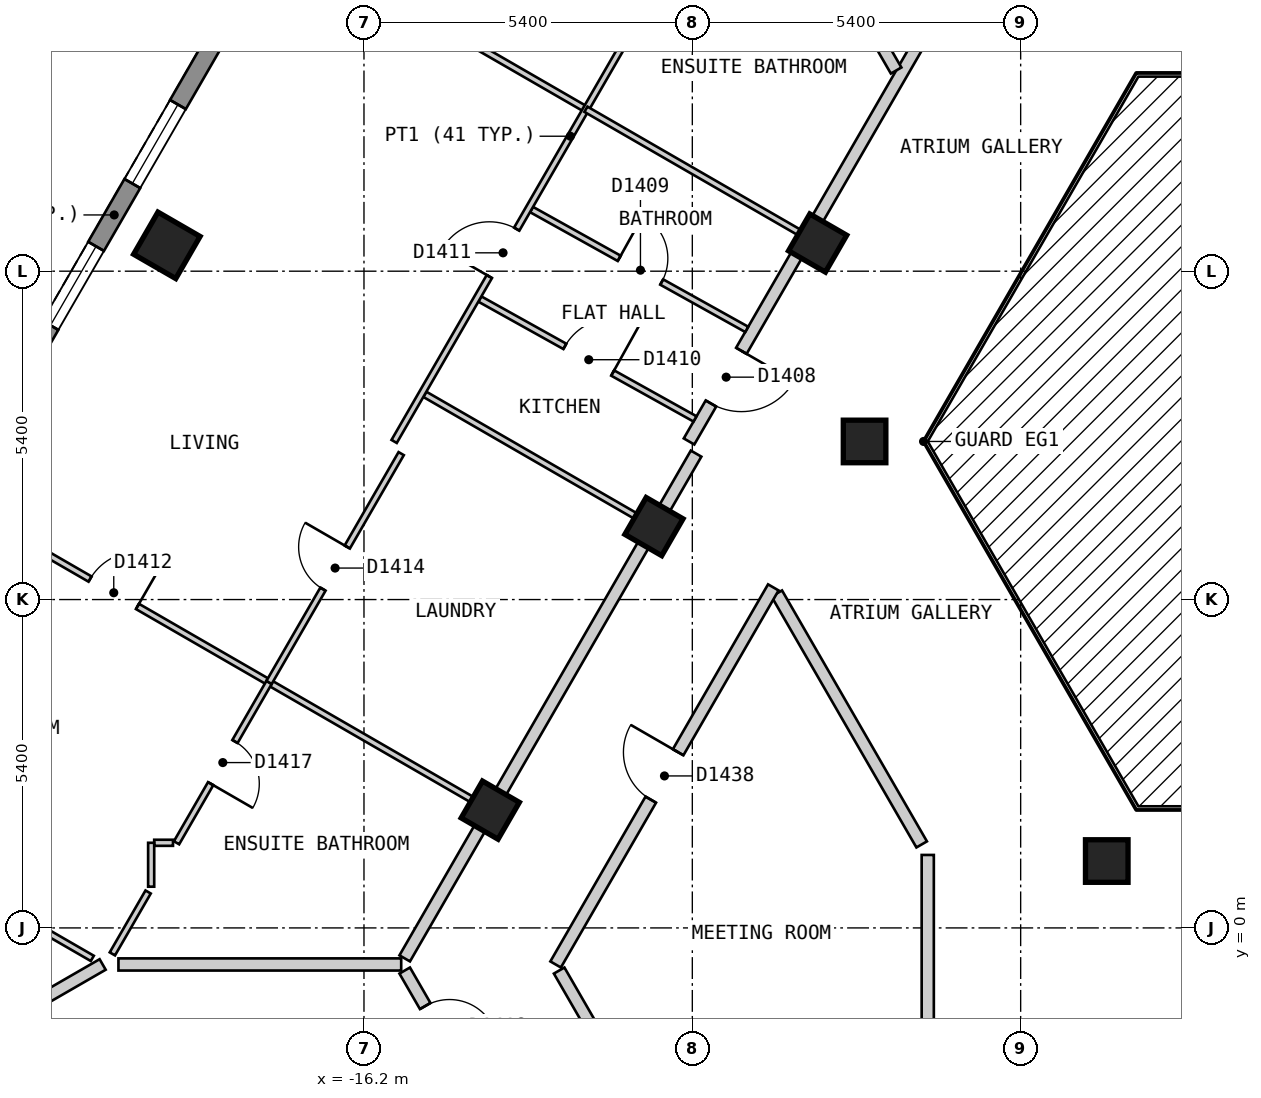
"""IFC4 building model, lengths in metres.
Left out: names, types, materials, properties, quantities, classifications, styles, units other than length and angle.
Written with IfcOpenShell. Run it as: python <this file> out.ifc"""

import sys

from ifc_helpers import new_model, si_unit, direction, frame, frame_2d, origin, origin_2d, place, context, subcontext, project, spatial, polyline, rectangle, outline, extrude, element, fill, save


model = new_model("IFC4")
c1 = context("Model", 3, precision=1e-05, world=origin(), true_north=direction((0.0, 1.0)))
c2 = subcontext(c1, "Body", "Model", "MODEL_VIEW")
j1 = project(units=[si_unit("LENGTHUNIT", "METRE"), si_unit("PLANEANGLEUNIT", "RADIAN")], contexts=[c1])
p1 = place(None, origin())
s1 = spatial("IfcSite", under=j1, at=p1, CompositionType="ELEMENT")
p2 = place(p1, origin())
s2 = spatial("IfcBuilding", under=s1, at=p2, CompositionType="ELEMENT")
p3 = place(p2, frame((0.0, 0.0, 178.2)))
s3 = spatial("IfcBuildingStorey", under=s2, at=p3, CompositionType="ELEMENT", Elevation=178.2)
p4 = place(p3, frame((-19.442, 11.225, 0.0), z_axis=(0.0, 0.0, 1.0), x_axis=(-0.5, -0.866025403784, 0.0)))
e1 = element("IfcColumn", 1, at=p4, inside=s3, PredefinedType="COLUMN", context=c2, shape_type="SweptSolid", body=[
    extrude(rectangle(XDim=0.8, YDim=0.8, at=origin_2d()), origin(), (0.0, 0.0, 1.0), 3.0),
])
for number, where, z_axis, x_axis in (
    (2, (-8.739, 11.263, 0.0), (0.0, 0.0, 1.0), (-0.5, -0.866, 0.0)),
    (3, (-7.967, 8.0, 0.0), (0.0, 0.0, 1.0), (1.0, 0.0, 0.0)),
    (4, (-11.431, 6.6, 0.0), (0.0, 0.0, 1.0), (-0.5, -0.866, 0.0)),
    (5, (-3.984, 1.1, 0.0), (0.0, 0.0, 1.0), (1.0, 0.0, 0.0)),
    (6, (-14.123, 1.937, 0.0), (0.0, 0.0, 1.0), (-0.5, -0.866, 0.0)),
):
    element("IfcColumn", number, at=place(p3, frame(where, z_axis=z_axis, x_axis=x_axis)), inside=s3, PredefinedType="COLUMN", context=c2, shape_type="SweptSolid", body=[
        extrude(rectangle(XDim=0.7, YDim=0.7, at=origin_2d()), origin(), (0.0, 0.0, 1.0), 3.0),
    ])
p5 = place(p3, frame((-14.592, 21.625, 0.0), z_axis=(0.0, 0.0, 1.0), x_axis=(-0.500010537973, -0.866019319597, 0.0)))
e7 = element("IfcWall", 7, at=p5, inside=s3, PredefinedType="SOLIDWALL", context=c2, shape_type="SweptSolid", body=[
    extrude(outline(polyline([(0.0, -0.15), (22.863, -0.15), (22.783, 0.15), (0.08, 0.15), (0.0, -0.15)])), origin(), (0.0, 0.0, 1.0), 2.7),
])
p6 = place(p5, frame((1.259, 0.0, 0.15)))
e8 = element("IfcOpeningElement", 8, at=p6, cuts=e7, PredefinedType="OPENING", context=c2, shape_type="SweptSolid", body=[
    extrude(rectangle(XDim=1.5, YDim=2.1, at=frame_2d((0.75, 1.05))), frame((0.0, 0.16, 0.0), z_axis=(0.0, -1.0, 0.0), x_axis=(1.0, 0.0, 0.0)), (0.0, 0.0, 1.0), 0.32),
])
p7 = place(p5, frame((3.952, 0.0, 0.15)))
e9 = element("IfcOpeningElement", 9, at=p7, cuts=e7, PredefinedType="OPENING", context=c2, shape_type="SweptSolid", body=[
    extrude(rectangle(XDim=1.5, YDim=2.1, at=frame_2d((0.75, 1.05))), frame((0.0, 0.16, 0.0), z_axis=(0.0, -1.0, 0.0), x_axis=(1.0, 0.0, 0.0)), (0.0, 0.0, 1.0), 0.32),
])
p8 = place(p5, frame((6.644, 0.0, 0.15)))
e10 = element("IfcOpeningElement", 10, at=p8, cuts=e7, PredefinedType="OPENING", context=c2, shape_type="SweptSolid", body=[
    extrude(rectangle(XDim=1.5, YDim=2.1, at=frame_2d((0.75, 1.05))), frame((0.0, 0.16, 0.0), z_axis=(0.0, -1.0, 0.0), x_axis=(1.0, 0.0, 0.0)), (0.0, 0.0, 1.0), 0.32),
])
p9 = place(p5, frame((9.335, 0.0, 0.15)))
e11 = element("IfcOpeningElement", 11, at=p9, cuts=e7, PredefinedType="OPENING", context=c2, shape_type="SweptSolid", body=[
    extrude(rectangle(XDim=1.5, YDim=2.1, at=frame_2d((0.75, 1.05))), frame((0.0, 0.16, 0.0), z_axis=(0.0, -1.0, 0.0), x_axis=(1.0, 0.0, 0.0)), (0.0, 0.0, 1.0), 0.32),
])
p10 = place(p5, frame((12.028, 0.0, 0.15)))
e12 = element("IfcOpeningElement", 12, at=p10, cuts=e7, PredefinedType="OPENING", context=c2, shape_type="SweptSolid", body=[
    extrude(rectangle(XDim=1.5, YDim=2.1, at=frame_2d((0.75, 1.05))), frame((0.0, 0.16, 0.0), z_axis=(0.0, -1.0, 0.0), x_axis=(1.0, 0.0, 0.0)), (0.0, 0.0, 1.0), 0.32),
])
p11 = place(p5, frame((14.72, 0.0, 0.15)))
e13 = element("IfcOpeningElement", 13, at=p11, cuts=e7, PredefinedType="OPENING", context=c2, shape_type="SweptSolid", body=[
    extrude(rectangle(XDim=1.5, YDim=2.1, at=frame_2d((0.75, 1.05))), frame((0.0, 0.16, 0.0), z_axis=(0.0, -1.0, 0.0), x_axis=(1.0, 0.0, 0.0)), (0.0, 0.0, 1.0), 0.32),
])
p12 = place(p5, frame((17.411, 0.0, 0.15)))
e14 = element("IfcOpeningElement", 14, at=p12, cuts=e7, PredefinedType="OPENING", context=c2, shape_type="SweptSolid", body=[
    extrude(rectangle(XDim=1.5, YDim=2.1, at=frame_2d((0.75, 1.05))), frame((0.0, 0.16, 0.0), z_axis=(0.0, -1.0, 0.0), x_axis=(1.0, 0.0, 0.0)), (0.0, 0.0, 1.0), 0.32),
])
p13 = place(p5, frame((20.104, 0.0, 0.15)))
e15 = element("IfcOpeningElement", 15, at=p13, cuts=e7, PredefinedType="OPENING", context=c2, shape_type="SweptSolid", body=[
    extrude(rectangle(XDim=1.5, YDim=2.1, at=frame_2d((0.75, 1.05))), frame((0.0, 0.16, 0.0), z_axis=(0.0, -1.0, 0.0), x_axis=(1.0, 0.0, 0.0)), (0.0, 0.0, 1.0), 0.32),
])
p14 = place(p3, frame((-9.411, 5.5, 0.0), z_axis=(0.0, 0.0, 1.0), x_axis=(0.500018099276, -0.86601495391, 0.0)))
e16 = element("IfcWall", 16, at=p14, inside=s3, PredefinedType="PARTITIONING", context=c2, shape_type="SweptSolid", body=[
    extrude(rectangle(XDim=4.765, YDim=0.2, at=frame_2d((2.383, 0.0))), origin(), (0.0, 0.0, 1.0), 2.7),
])
p15 = place(p3, frame((-12.99, -0.701, 0.0), z_axis=(0.0, 0.0, 1.0), x_axis=(0.499972710878, -0.866041158593, 0.0)))
e17 = element("IfcWall", 17, at=p15, inside=s3, PredefinedType="PARTITIONING", context=c2, shape_type="SweptSolid", body=[
    extrude(rectangle(XDim=2.308, YDim=0.2, at=frame_2d((1.154, 0.0))), origin(), (0.0, 0.0, 1.0), 2.7),
])
p16 = place(p3, frame((-15.53, -0.701, 0.0), z_axis=(0.0, 0.0, 1.0), x_axis=(0.499972710878, -0.866041158593, 0.0)))
e18 = element("IfcWall", 18, at=p16, inside=s3, PredefinedType="PARTITIONING", context=c2, shape_type="SweptSolid", body=[
    extrude(rectangle(XDim=2.308, YDim=0.2, at=frame_2d((1.154, 0.0))), origin(), (0.0, 0.0, 1.0), 2.7),
])
p17 = place(p16, frame((0.674, 0.0, 0.0)))
e19 = element("IfcOpeningElement", 19, at=p17, cuts=e18, PredefinedType="OPENING", context=c2, shape_type="SweptSolid", body=[
    extrude(rectangle(XDim=0.8, YDim=2.1, at=frame_2d((0.4, 1.05))), frame((0.0, 0.11, 0.0), z_axis=(0.0, -1.0, 0.0), x_axis=(1.0, 0.0, 0.0)), (0.0, 0.0, 1.0), 0.22),
])
p18 = place(p3, frame((-13.048, -0.601, 0.0), z_axis=(0.0, 0.0, 1.0), x_axis=(0.499982180423, 0.866035691677, 0.0)))
e20 = element("IfcWall", 20, at=p18, inside=s3, PredefinedType="PARTITIONING", context=c2, shape_type="SweptSolid", body=[
    extrude(rectangle(XDim=7.16, YDim=0.2, at=frame_2d((3.58, 0.0))), origin(), (0.0, 0.0, 1.0), 2.7),
])
p19 = place(p18, frame((3.13, 0.0, 0.0)))
e21 = element("IfcOpeningElement", 21, at=p19, cuts=e20, PredefinedType="OPENING", context=c2, shape_type="SweptSolid", body=[
    extrude(rectangle(XDim=0.9, YDim=2.1, at=frame_2d((0.45, 1.05))), frame((0.0, 0.11, 0.0), z_axis=(0.0, -1.0, 0.0), x_axis=(1.0, 0.0, 0.0)), (0.0, 0.0, 1.0), 0.22),
])
p20 = place(p3, frame((-15.53, -0.501, 0.0), z_axis=(0.0, 0.0, 1.0), x_axis=(0.499952498232, 0.866052827206, 0.0)))
e22 = element("IfcWall", 22, at=p20, inside=s3, PredefinedType="PARTITIONING", context=c2, shape_type="SweptSolid", body=[
    extrude(rectangle(XDim=9.585, YDim=0.2, at=frame_2d((4.792, 0.0))), origin(), (0.0, 0.0, 1.0), 2.7),
])
p21 = place(p3, frame((-10.854, 8.0, 0.0), z_axis=(0.0, 0.0, 1.0), x_axis=(0.499997637144, 0.866026767976, 0.0)))
e23 = element("IfcWall", 23, at=p21, inside=s3, PredefinedType="PARTITIONING", context=c2, shape_type="SweptSolid", body=[
    extrude(rectangle(XDim=10.854, YDim=0.2, at=frame_2d((5.427, 0.0))), origin(), (0.0, 0.0, 1.0), 2.7),
])
p22 = place(p21, frame((0.721, 0.0, 0.0)))
e24 = element("IfcOpeningElement", 24, at=p22, cuts=e23, PredefinedType="OPENING", context=c2, shape_type="SweptSolid", body=[
    extrude(rectangle(XDim=1.0, YDim=2.1, at=frame_2d((0.5, 1.05))), frame((0.0, 0.11, 0.0), z_axis=(0.0, -1.0, 0.0), x_axis=(1.0, 0.0, 0.0)), (0.0, 0.0, 1.0), 0.22),
])
p23 = place(p3, frame((-6.928, -2.8, 0.0), z_axis=(0.0, 0.0, 1.0), x_axis=(0.0, 1.0, 0.0)))
e25 = element("IfcWall", 25, at=p23, inside=s3, PredefinedType="PARTITIONING", context=c2, shape_type="SweptSolid", body=[
    extrude(rectangle(XDim=4.0, YDim=0.2, at=frame_2d((2.0, 0.0))), origin(), (0.0, 0.0, 1.0), 2.7),
])
p24 = place(p3, frame((-13.444, 11.814, 0.0), z_axis=(0.0, 0.0, 1.0), x_axis=(0.873653620945, -0.486548405207, 0.0)))
e26 = element("IfcWall", 26, at=p24, inside=s3, PredefinedType="PARTITIONING", context=c2, shape_type="SweptSolid", body=[
    extrude(rectangle(XDim=4.051, YDim=0.1, at=frame_2d((2.025, 0.0))), origin(), (0.0, 0.0, 1.0), 2.7),
])
p25 = place(p24, frame((1.65, 0.0, 0.0)))
e27 = element("IfcOpeningElement", 27, at=p25, cuts=e26, PredefinedType="OPENING", context=c2, shape_type="SweptSolid", body=[
    extrude(rectangle(XDim=0.8, YDim=2.1, at=frame_2d((0.4, 1.05))), frame((0.0, 0.06, 0.0), z_axis=(0.0, -1.0, 0.0), x_axis=(1.0, 0.0, 0.0)), (0.0, 0.0, 1.0), 0.12),
])
p26 = place(p3, frame((-14.294, 10.342, 0.0), z_axis=(0.0, 0.0, 1.0), x_axis=(0.873582256032, -0.486676527013, 0.0)))
e28 = element("IfcWall", 28, at=p26, inside=s3, PredefinedType="PARTITIONING", context=c2, shape_type="SweptSolid", body=[
    extrude(rectangle(XDim=4.05, YDim=0.1, at=frame_2d((2.025, 0.0))), origin(), (0.0, 0.0, 1.0), 2.7),
])
p27 = place(p26, frame((1.6, 0.0, 0.0)))
e29 = element("IfcOpeningElement", 29, at=p27, cuts=e28, PredefinedType="OPENING", context=c2, shape_type="SweptSolid", body=[
    extrude(rectangle(XDim=0.9, YDim=2.1, at=frame_2d((0.45, 1.05))), frame((0.0, 0.06, 0.0), z_axis=(0.0, -1.0, 0.0), x_axis=(1.0, 0.0, 0.0)), (0.0, 0.0, 1.0), 0.12),
])
p28 = place(p3, frame((-22.87, 6.987, 0.0), z_axis=(0.0, 0.0, 1.0), x_axis=(0.866022959057, -0.500004234368, 0.0)))
e30 = element("IfcWall", 30, at=p28, inside=s3, PredefinedType="PARTITIONING", context=c2, shape_type="SweptSolid", body=[
    extrude(rectangle(XDim=10.0, YDim=0.1, at=frame_2d((5.0, 0.0))), origin(), (0.0, 0.0, 1.0), 2.7),
])
p29 = place(p28, frame((2.5, 0.0, 0.0)))
e31 = element("IfcOpeningElement", 31, at=p29, cuts=e30, PredefinedType="OPENING", context=c2, shape_type="SweptSolid", body=[
    extrude(rectangle(XDim=0.9, YDim=2.1, at=frame_2d((0.45, 1.05))), frame((0.0, 0.06, 0.0), z_axis=(0.0, -1.0, 0.0), x_axis=(1.0, 0.0, 0.0)), (0.0, 0.0, 1.0), 0.12),
])
p30 = place(p3, frame((-25.562, 2.325, 0.0), z_axis=(0.0, 0.0, 1.0), x_axis=(0.865998530728, -0.500046542611, 0.0)))
e32 = element("IfcWall", 32, at=p30, inside=s3, PredefinedType="PARTITIONING", context=c2, shape_type="SweptSolid", body=[
    extrude(rectangle(XDim=5.651, YDim=0.1, at=frame_2d((2.826, 0.0))), origin(), (0.0, 0.0, 1.0), 2.7),
])
p31 = place(p30, frame((2.476, 0.0, 0.0)))
e33 = element("IfcOpeningElement", 33, at=p31, cuts=e32, PredefinedType="OPENING", context=c2, shape_type="SweptSolid", body=[
    extrude(rectangle(XDim=0.9, YDim=2.1, at=frame_2d((0.45, 1.05))), frame((0.0, 0.06, 0.0), z_axis=(0.0, -1.0, 0.0), x_axis=(1.0, 0.0, 0.0)), (0.0, 0.0, 1.0), 0.12),
])
p32 = place(p3, frame((-15.199, 8.775, 0.0), z_axis=(0.0, 0.0, 1.0), x_axis=(0.866043063166, -0.499969411806, 0.0)))
e34 = element("IfcWall", 34, at=p32, inside=s3, PredefinedType="PARTITIONING", context=c2, shape_type="SweptSolid", body=[
    extrude(rectangle(XDim=4.25, YDim=0.1, at=frame_2d((2.125, 0.0))), origin(), (0.0, 0.0, 1.0), 2.7),
])
p33 = place(p3, frame((-17.486, 16.313, 0.0), z_axis=(0.0, 0.0, 1.0), x_axis=(0.866004402611, -0.500036373335, 0.0)))
e35 = element("IfcWall", 35, at=p33, inside=s3, PredefinedType="PARTITIONING", context=c2, shape_type="SweptSolid", body=[
    extrude(rectangle(XDim=5.7, YDim=0.1, at=frame_2d((2.85, 0.0))), origin(), (0.0, 0.0, 1.0), 2.7),
])
p34 = place(p33, frame((2.4, 0.0, 0.0)))
e36 = element("IfcOpeningElement", 36, at=p34, cuts=e35, PredefinedType="OPENING", context=c2, shape_type="SweptSolid", body=[
    extrude(rectangle(XDim=0.9, YDim=2.1, at=frame_2d((0.45, 1.05))), frame((0.0, 0.06, 0.0), z_axis=(0.0, -1.0, 0.0), x_axis=(1.0, 0.0, 0.0)), (0.0, 0.0, 1.0), 0.12),
])
p35 = place(p3, frame((-19.65, 1.4, 0.0), z_axis=(0.0, 0.0, 1.0), x_axis=(1.0, 0.0, 0.0)))
e37 = element("IfcWall", 37, at=p35, inside=s3, PredefinedType="PARTITIONING", context=c2, shape_type="SweptSolid", body=[
    extrude(rectangle(XDim=0.309, YDim=0.1, at=frame_2d((0.154, 0.0))), origin(), (0.0, 0.0, 1.0), 2.7),
])
p36 = place(p3, frame((-20.338, -0.427, 0.0), z_axis=(0.0, 0.0, 1.0), x_axis=(0.500069990121, 0.865984991198, 0.0)))
e38 = element("IfcWall", 38, at=p36, inside=s3, PredefinedType="PARTITIONING", context=c2, shape_type="SweptSolid", body=[
    extrude(rectangle(XDim=1.176, YDim=0.1, at=frame_2d((0.588, 0.0))), origin(), (0.0, 0.0, 1.0), 2.7),
])
p37 = place(p3, frame((-19.283, 1.4, 0.0), z_axis=(0.0, 0.0, 1.0), x_axis=(0.499847391584, 0.866113494368, 0.0)))
e39 = element("IfcWall", 39, at=p37, inside=s3, PredefinedType="PARTITIONING", context=c2, shape_type="SweptSolid", body=[
    extrude(rectangle(XDim=3.045, YDim=0.1, at=frame_2d((1.522, 0.0))), origin(), (0.0, 0.0, 1.0), 2.7),
])
p38 = place(p37, frame((1.123, 0.0, 0.0)))
e40 = element("IfcOpeningElement", 40, at=p38, cuts=e39, PredefinedType="OPENING", context=c2, shape_type="SweptSolid", body=[
    extrude(rectangle(XDim=0.8, YDim=2.1, at=frame_2d((0.4, 1.05))), frame((0.0, 0.06, 0.0), z_axis=(0.0, -1.0, 0.0), x_axis=(1.0, 0.0, 0.0)), (0.0, 0.0, 1.0), 0.12),
])
p39 = place(p3, frame((-15.704, 8.0, 0.0), z_axis=(0.0, 0.0, 1.0), x_axis=(0.500005637941, 0.866022148693, 0.0)))
e41 = element("IfcWall", 41, at=p39, inside=s3, PredefinedType="PARTITIONING", context=c2, shape_type="SweptSolid", body=[
    extrude(rectangle(XDim=11.592, YDim=0.1, at=frame_2d((5.796, 0.0))), origin(), (0.0, 0.0, 1.0), 2.7),
])
p40 = place(p39, frame((3.132, 0.0, 0.0)))
e42 = element("IfcOpeningElement", 42, at=p40, cuts=e41, PredefinedType="OPENING", context=c2, shape_type="SweptSolid", body=[
    extrude(rectangle(XDim=0.9, YDim=2.1, at=frame_2d((0.45, 1.05))), frame((0.0, 0.06, 0.0), z_axis=(0.0, -1.0, 0.0), x_axis=(1.0, 0.0, 0.0)), (0.0, 0.0, 1.0), 0.12),
])
p41 = place(p39, frame((8.6, 0.0, 0.0)))
e43 = element("IfcOpeningElement", 43, at=p41, cuts=e41, PredefinedType="OPENING", context=c2, shape_type="SweptSolid", body=[
    extrude(rectangle(XDim=0.8, YDim=2.1, at=frame_2d((0.4, 1.05))), frame((0.0, 0.06, 0.0), z_axis=(0.0, -1.0, 0.0), x_axis=(1.0, 0.0, 0.0)), (0.0, 0.0, 1.0), 0.12),
])
p42 = place(p3, frame((-19.7, 0.678, 0.0), z_axis=(0.0, 0.0, 1.0), x_axis=(0.0, 1.0, 0.0)))
e44 = element("IfcWall", 44, at=p42, inside=s3, PredefinedType="PARTITIONING", context=c2, shape_type="SweptSolid", body=[
    extrude(rectangle(XDim=0.722, YDim=0.1, at=frame_2d((0.361, 0.0))), origin(), (0.0, 0.0, 1.0), 2.7),
])
p43 = place(p3, frame((-9.728, 18.05, 0.0), z_axis=(0.0, 0.0, 1.0), x_axis=(0.499921709333, -0.866070600204, 0.0)))
e45 = element("IfcWall", 45, at=p43, inside=s3, PredefinedType="PARTITIONING", context=c2, shape_type="SweptSolid", body=[
    extrude(rectangle(XDim=4.561, YDim=0.2, at=frame_2d((2.28, 0.0))), origin(), (0.0, 0.0, 1.0), 2.7),
])
p44 = place(p3, frame((-20.238, -0.601, 0.0), z_axis=(0.0, 0.0, 1.0), x_axis=(1.0, 0.0, 0.0)))
e46 = element("IfcWall", 46, at=p44, inside=s3, PredefinedType="PARTITIONING", context=c2, shape_type="SweptSolid", body=[
    extrude(rectangle(XDim=4.65, YDim=0.2, at=frame_2d((2.325, 0.0))), origin(), (0.0, 0.0, 1.0), 2.7),
])
p45 = place(p3, frame((-25.563, -3.524, 0.0), z_axis=(0.0, 0.0, 1.0), x_axis=(0.866128586522, 0.499821239653, 0.0)))
e47 = element("IfcWall", 47, at=p45, inside=s3, PredefinedType="PARTITIONING", context=c2, shape_type="SweptSolid", body=[
    extrude(rectangle(XDim=5.848, YDim=0.2, at=frame_2d((2.924, 0.0))), origin(), (0.0, 0.0, 1.0), 2.7),
])
p46 = place(p3, frame((-17.761, 4.037, 0.0), z_axis=(0.0, 0.0, 1.0), x_axis=(0.50009692756, 0.865969435399, 0.0)))
e48 = element("IfcWall", 48, at=p46, inside=s3, PredefinedType="PARTITIONING", context=c2, shape_type="SweptSolid", body=[
    extrude(rectangle(XDim=4.345, YDim=0.1, at=frame_2d((2.173, 0.0))), origin(), (0.0, 0.0, 1.0), 2.7),
])
p47 = place(p46, frame((1.772, 0.0, 0.0)))
e49 = element("IfcOpeningElement", 49, at=p47, cuts=e48, PredefinedType="OPENING", context=c2, shape_type="SweptSolid", body=[
    extrude(rectangle(XDim=0.8, YDim=2.1, at=frame_2d((0.4, 1.05))), frame((0.0, 0.06, 0.0), z_axis=(0.0, -1.0, 0.0), x_axis=(1.0, 0.0, 0.0)), (0.0, 0.0, 1.0), 0.12),
])
p48 = place(p3, frame((-12.55, 13.463, 0.0), z_axis=(0.0, 0.0, 1.0), x_axis=(0.86606561423, -0.499930346997, 0.0)))
e50 = element("IfcWall", 50, at=p48, inside=s3, PredefinedType="PARTITIONING", context=c2, shape_type="SweptSolid", body=[
    extrude(rectangle(XDim=4.1, YDim=0.1, at=frame_2d((2.05, 0.0))), origin(), (0.0, 0.0, 1.0), 2.7),
])
p49 = place(p9, origin())
e51 = element("IfcWindow", 51, at=p49, inside=s3, PartitioningType="SINGLE_PANEL", PredefinedType="WINDOW", context=c2, shape_type="SweptSolid", body=[
    extrude(rectangle(XDim=1.5, YDim=2.1, at=frame_2d((0.75, 1.05))), frame((0.0, 0.03, 0.0), z_axis=(0.0, -1.0, 0.0), x_axis=(1.0, 0.0, 0.0)), (0.0, 0.0, 1.0), 0.06),
])
fill(e11, e51)
p50 = place(p10, origin())
e52 = element("IfcWindow", 52, at=p50, inside=s3, PartitioningType="SINGLE_PANEL", PredefinedType="WINDOW", context=c2, shape_type="SweptSolid", body=[
    extrude(rectangle(XDim=1.5, YDim=2.1, at=frame_2d((0.75, 1.05))), frame((0.0, 0.03, 0.0), z_axis=(0.0, -1.0, 0.0), x_axis=(1.0, 0.0, 0.0)), (0.0, 0.0, 1.0), 0.06),
])
fill(e12, e52)
p51 = place(p22, origin())
e53 = element("IfcDoor", 53, at=p51, inside=s3, OperationType="SINGLE_SWING_RIGHT", PredefinedType="DOOR", context=c2, shape_type="SweptSolid", body=[
    extrude(rectangle(XDim=1.0, YDim=2.1, at=frame_2d((0.5, 1.05))), frame((0.0, 0.025, 0.0), z_axis=(0.0, -1.0, 0.0), x_axis=(1.0, 0.0, 0.0)), (0.0, 0.0, 1.0), 0.05),
])
fill(e24, e53)
p52 = place(p25, origin())
e54 = element("IfcDoor", 54, at=p52, inside=s3, OperationType="SINGLE_SWING_LEFT", PredefinedType="DOOR", context=c2, shape_type="SweptSolid", body=[
    extrude(rectangle(XDim=0.8, YDim=2.1, at=frame_2d((0.4, 1.05))), frame((0.0, 0.025, 0.0), z_axis=(0.0, -1.0, 0.0), x_axis=(1.0, 0.0, 0.0)), (0.0, 0.0, 1.0), 0.05),
])
fill(e27, e54)
p53 = place(p27, origin())
e55 = element("IfcDoor", 55, at=p53, inside=s3, OperationType="SINGLE_SWING_RIGHT", PredefinedType="DOOR", context=c2, shape_type="SweptSolid", body=[
    extrude(rectangle(XDim=0.9, YDim=2.1, at=frame_2d((0.45, 1.05))), frame((0.0, 0.025, 0.0), z_axis=(0.0, -1.0, 0.0), x_axis=(1.0, 0.0, 0.0)), (0.0, 0.0, 1.0), 0.05),
])
fill(e29, e55)
p54 = place(p40, origin())
e56 = element("IfcDoor", 56, at=p54, inside=s3, OperationType="SINGLE_SWING_LEFT", PredefinedType="DOOR", context=c2, shape_type="SweptSolid", body=[
    extrude(rectangle(XDim=0.9, YDim=2.1, at=frame_2d((0.45, 1.05))), frame((0.0, 0.025, 0.0), z_axis=(0.0, -1.0, 0.0), x_axis=(1.0, 0.0, 0.0)), (0.0, 0.0, 1.0), 0.05),
])
fill(e42, e56)
p55 = place(p29, origin())
e57 = element("IfcDoor", 57, at=p55, inside=s3, OperationType="SINGLE_SWING_RIGHT", PredefinedType="DOOR", context=c2, shape_type="SweptSolid", body=[
    extrude(rectangle(XDim=0.9, YDim=2.1, at=frame_2d((0.45, 1.05))), frame((0.0, 0.025, 0.0), z_axis=(0.0, -1.0, 0.0), x_axis=(1.0, 0.0, 0.0)), (0.0, 0.0, 1.0), 0.05),
])
fill(e31, e57)
p56 = place(p47, origin())
e58 = element("IfcDoor", 58, at=p56, inside=s3, OperationType="SINGLE_SWING_RIGHT", PredefinedType="DOOR", context=c2, shape_type="SweptSolid", body=[
    extrude(rectangle(XDim=0.8, YDim=2.1, at=frame_2d((0.4, 1.05))), frame((0.0, 0.025, 0.0), z_axis=(0.0, -1.0, 0.0), x_axis=(1.0, 0.0, 0.0)), (0.0, 0.0, 1.0), 0.05),
])
fill(e49, e58)
p57 = place(p38, origin())
e59 = element("IfcDoor", 59, at=p57, inside=s3, OperationType="SINGLE_SWING_LEFT", PredefinedType="DOOR", context=c2, shape_type="SweptSolid", body=[
    extrude(rectangle(XDim=0.8, YDim=2.1, at=frame_2d((0.4, 1.05))), frame((0.0, 0.025, 0.0), z_axis=(0.0, -1.0, 0.0), x_axis=(1.0, 0.0, 0.0)), (0.0, 0.0, 1.0), 0.05),
])
fill(e40, e59)
p58 = place(p17, origin())
e60 = element("IfcDoor", 60, at=p58, inside=s3, OperationType="SINGLE_SWING_RIGHT", PredefinedType="DOOR", context=c2, shape_type="SweptSolid", body=[
    extrude(rectangle(XDim=0.8, YDim=2.1, at=frame_2d((0.4, 1.05))), frame((0.0, 0.025, 0.0), z_axis=(0.0, -1.0, 0.0), x_axis=(1.0, 0.0, 0.0)), (0.0, 0.0, 1.0), 0.05),
])
fill(e19, e60)
p59 = place(p19, origin())
e61 = element("IfcDoor", 61, at=p59, inside=s3, OperationType="SINGLE_SWING_RIGHT", PredefinedType="DOOR", context=c2, shape_type="SweptSolid", body=[
    extrude(rectangle(XDim=0.9, YDim=2.1, at=frame_2d((0.45, 1.05))), frame((0.0, 0.025, 0.0), z_axis=(0.0, -1.0, 0.0), x_axis=(1.0, 0.0, 0.0)), (0.0, 0.0, 1.0), 0.05),
])
fill(e21, e61)
save(model, sys.argv[1])
